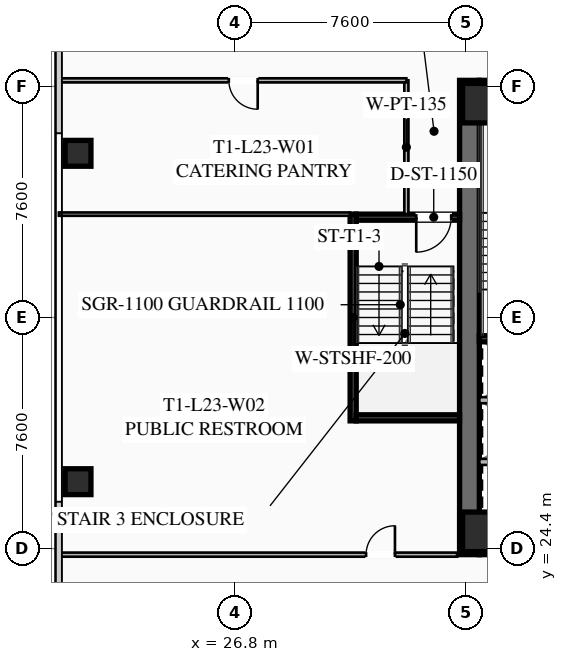
"""IFC4 building model, lengths in metres.
Left out: names, types, materials, properties, quantities, classifications, styles, units other than length and angle.
Written with IfcOpenShell. Run it as: python <this file> out.ifc"""

import sys

from ifc_helpers import new_model, si_unit, direction, frame, frame_2d, origin, origin_2d, place, context, subcontext, project, spatial, rectangle, hollow_rectangle, extrude, element, fill, save


model = new_model("IFC4")
c1 = context("Model", 3, precision=1e-05, world=origin(), true_north=direction((0.0, 1.0)))
c2 = subcontext(c1, "Body", "Model", "MODEL_VIEW")
j1 = project(units=[si_unit("LENGTHUNIT", "METRE"), si_unit("PLANEANGLEUNIT", "RADIAN")], contexts=[c1])
p1 = place(None, origin())
s1 = spatial("IfcSite", under=j1, at=p1, CompositionType="ELEMENT")
p2 = place(p1, origin())
s2 = spatial("IfcBuilding", under=s1, at=p2, CompositionType="ELEMENT")
p3 = place(p2, frame((0.0, 0.0, 88.5)))
s3 = spatial("IfcBuildingStorey", under=s2, at=p3, CompositionType="ELEMENT", Elevation=88.5)
p4 = place(p3, frame((34.525, 24.2, 0.0), z_axis=(0.0, 0.0, 1.0), x_axis=(0.0, 1.0, 0.0)))
e1 = element("IfcWall", 1, at=p4, inside=s3, PredefinedType="SHEAR", context=c2, shape_type="SweptSolid", body=[
    extrude(rectangle(XDim=15.6, YDim=0.65, at=frame_2d((7.8, 0.0))), origin(), (0.0, 0.0, 1.0), 3.55),
])
p5 = place(p3, frame((49.15, 24.525, 0.0), z_axis=(0.0, 0.0, 1.0), x_axis=(-1.0, 0.0, 0.0)))
e2 = element("IfcWall", 2, at=p5, inside=s3, PredefinedType="SHEAR", context=c2, shape_type="SweptSolid", body=[
    extrude(rectangle(XDim=14.3, YDim=0.65, at=frame_2d((7.15, 0.0))), origin(), (0.0, 0.0, 1.0), 3.55),
])
p6 = place(p5, frame((8.85, 0.0, 0.0)))
e3 = element("IfcOpeningElement", 3, at=p6, cuts=e2, PredefinedType="OPENING", context=c2, shape_type="SweptSolid", body=[
    extrude(rectangle(XDim=1.25, YDim=2.25, at=frame_2d((0.625, 1.125))), frame((0.0, 0.335, 0.0), z_axis=(0.0, -1.0, 0.0), x_axis=(1.0, 0.0, 0.0)), (0.0, 0.0, 1.0), 0.67),
])
p7 = place(p5, frame((3.8, 0.0, 0.0)))
e4 = element("IfcOpeningElement", 4, at=p7, cuts=e2, PredefinedType="OPENING", context=c2, shape_type="SweptSolid", body=[
    extrude(rectangle(XDim=1.25, YDim=2.25, at=frame_2d((0.625, 1.125))), frame((0.0, 0.335, 0.0), z_axis=(0.0, -1.0, 0.0), x_axis=(1.0, 0.0, 0.0)), (0.0, 0.0, 1.0), 0.67),
])
p8 = place(p3, frame((34.85, 39.475, 0.0), z_axis=(0.0, 0.0, 1.0), x_axis=(1.0, 0.0, 0.0)))
e5 = element("IfcWall", 5, at=p8, inside=s3, PredefinedType="SHEAR", context=c2, shape_type="SweptSolid", body=[
    extrude(rectangle(XDim=14.3, YDim=0.65, at=frame_2d((7.15, 0.0))), origin(), (0.0, 0.0, 1.0), 3.55),
])
p9 = place(p8, frame((4.2, 0.0, 0.0)))
e6 = element("IfcOpeningElement", 6, at=p9, cuts=e5, PredefinedType="OPENING", context=c2, shape_type="SweptSolid", body=[
    extrude(rectangle(XDim=1.25, YDim=2.25, at=frame_2d((0.625, 1.125))), frame((0.0, 0.335, 0.0), z_axis=(0.0, -1.0, 0.0), x_axis=(1.0, 0.0, 0.0)), (0.0, 0.0, 1.0), 0.67),
])
p10 = place(p8, frame((9.25, 0.0, 0.0)))
e7 = element("IfcOpeningElement", 7, at=p10, cuts=e5, PredefinedType="OPENING", context=c2, shape_type="SweptSolid", body=[
    extrude(rectangle(XDim=1.25, YDim=2.25, at=frame_2d((0.625, 1.125))), frame((0.0, 0.335, 0.0), z_axis=(0.0, -1.0, 0.0), x_axis=(1.0, 0.0, 0.0)), (0.0, 0.0, 1.0), 0.67),
])
for number, where, z_axis, x_axis in (
    (8, (34.95, 24.95, 0.0), (0.0, 0.0, 1.0), (1.0, 0.0, 0.0)),
    (9, (34.95, 39.05, 0.0), (0.0, 0.0, 1.0), (1.0, 0.0, 0.0)),
):
    element("IfcColumn", number, at=place(p3, frame(where, z_axis=z_axis, x_axis=x_axis)), inside=s3, PredefinedType="COLUMN", context=c2, shape_type="SweptSolid", body=[
        extrude(hollow_rectangle(XDim=1.3, YDim=1.3, WallThickness=0.05, at=origin_2d()), origin(), (0.0, 0.0, 1.0), 3.35),
    ])
for number, where, z_axis, x_axis in (
    (10, (21.65, 37.4, 0.0), (0.0, 0.0, 1.0), (1.0, 0.0, 0.0)),
    (11, (21.65, 26.6, 0.0), (0.0, 0.0, 1.0), (1.0, 0.0, 0.0)),
):
    element("IfcColumn", number, at=place(p3, frame(where, z_axis=z_axis, x_axis=x_axis)), inside=s3, PredefinedType="COLUMN", context=c2, shape_type="SweptSolid", body=[
        extrude(hollow_rectangle(XDim=0.85, YDim=0.85, WallThickness=0.035, at=origin_2d()), origin(), (0.0, 0.0, 1.0), 3.35),
    ])
for number, where, z_axis, x_axis in (
    (12, (34.85, 31.3, 0.0), (0.0, 0.0, 1.0), (1.0, 0.0, 0.0)),
    (13, (34.85, 38.7, 0.0), (0.0, 0.0, 1.0), (1.0, 0.0, 0.0)),
):
    element("IfcWall", number, at=place(p3, frame(where, z_axis=z_axis, x_axis=x_axis)), inside=s3, PredefinedType="SHEAR", context=c2, shape_type="SweptSolid", body=[
        extrude(rectangle(XDim=3.45, YDim=0.2, at=frame_2d((1.725, 0.0))), origin(), (0.0, 0.0, 1.0), 3.35),
    ])
for number, where, z_axis, x_axis in (
    (14, (34.85, 27.25, 0.0), (0.0, 0.0, 1.0), (1.0, 0.0, 0.0)),
    (15, (34.85, 29.28, 0.0), (0.0, 0.0, 1.0), (1.0, 0.0, 0.0)),
):
    element("IfcWall", number, at=place(p3, frame(where, z_axis=z_axis, x_axis=x_axis)), inside=s3, PredefinedType="SOLIDWALL", context=c2, shape_type="SweptSolid", body=[
        extrude(rectangle(XDim=3.1, YDim=0.2, at=frame_2d((1.55, 0.0))), origin(), (0.0, 0.0, 1.0), 3.35),
    ])
p11 = place(p3, frame((30.7, 28.6, 0.0), z_axis=(0.0, 0.0, 1.0), x_axis=(0.0, 1.0, 0.0)))
e16 = element("IfcWall", 16, at=p11, inside=s3, PredefinedType="SHEAR", context=c2, shape_type="SweptSolid", body=[
    extrude(rectangle(XDim=6.8, YDim=0.2, at=frame_2d((3.4, 0.0))), origin(), (0.0, 0.0, 1.0), 3.35),
])
p12 = place(p3, frame((34.2, 35.3, 0.0), z_axis=(0.0, 0.0, 1.0), x_axis=(-1.0, 0.0, 0.0)))
e17 = element("IfcWall", 17, at=p12, inside=s3, PredefinedType="SHEAR", context=c2, shape_type="SweptSolid", body=[
    extrude(rectangle(XDim=3.4, YDim=0.2, at=frame_2d((1.7, 0.0))), origin(), (0.0, 0.0, 1.0), 3.35),
])
p13 = place(p12, frame((0.275, 0.0, 0.0)))
e18 = element("IfcOpeningElement", 18, at=p13, cuts=e17, PredefinedType="OPENING", context=c2, shape_type="SweptSolid", body=[
    extrude(rectangle(XDim=1.15, YDim=2.2, at=frame_2d((0.575, 1.1))), frame((0.0, 0.11, 0.0), z_axis=(0.0, -1.0, 0.0), x_axis=(1.0, 0.0, 0.0)), (0.0, 0.0, 1.0), 0.22),
])
p14 = place(p3, frame((30.8, 28.7, 0.0), z_axis=(0.0, 0.0, 1.0), x_axis=(1.0, 0.0, 0.0)))
e19 = element("IfcWall", 19, at=p14, inside=s3, PredefinedType="SHEAR", context=c2, shape_type="SweptSolid", body=[
    extrude(rectangle(XDim=3.4, YDim=0.2, at=frame_2d((1.7, 0.0))), origin(), (0.0, 0.0, 1.0), 3.35),
])
p15 = place(p3, frame((32.45, 35.4, 0.0), z_axis=(0.0, 0.0, 1.0), x_axis=(0.0, 1.0, 0.0)))
e20 = element("IfcWall", 20, at=p15, inside=s3, PredefinedType="PARTITIONING", context=c2, shape_type="SweptSolid", body=[
    extrude(rectangle(XDim=4.4, YDim=0.135, at=frame_2d((2.2, 0.0))), origin(), (0.0, 0.0, 1.0), 2.703),
])
p16 = place(p3, frame((32.45, 39.8, 0.0), z_axis=(0.0, 0.0, 1.0), x_axis=(-1.0, 0.0, 0.0)))
e21 = element("IfcWall", 21, at=p16, inside=s3, PredefinedType="PARTITIONING", context=c2, shape_type="SweptSolid", body=[
    extrude(rectangle(XDim=11.43, YDim=0.135, at=frame_2d((5.715, 0.0))), origin(), (0.0, 0.0, 1.0), 2.703),
])
p17 = place(p16, frame((4.89, 0.0, 0.0)))
e22 = element("IfcOpeningElement", 22, at=p17, cuts=e21, PredefinedType="OPENING", context=c2, shape_type="SweptSolid", body=[
    extrude(rectangle(XDim=0.95, YDim=2.05, at=frame_2d((0.475, 1.025))), frame((0.0, 0.077, 0.0), z_axis=(0.0, -1.0, 0.0), x_axis=(1.0, 0.0, 0.0)), (0.0, 0.0, 1.0), 0.155),
])
p18 = place(p3, frame((21.02, 24.2, 0.0), z_axis=(0.0, 0.0, 1.0), x_axis=(1.0, 0.0, 0.0)))
e23 = element("IfcWall", 23, at=p18, inside=s3, PredefinedType="PARTITIONING", context=c2, shape_type="SweptSolid", body=[
    extrude(rectangle(XDim=13.1, YDim=0.135, at=frame_2d((6.55, 0.0))), origin(), (0.0, 0.0, 1.0), 2.703),
])
p19 = place(p18, frame((10.105, 0.0, 0.0)))
e24 = element("IfcOpeningElement", 24, at=p19, cuts=e23, PredefinedType="OPENING", context=c2, shape_type="SweptSolid", body=[
    extrude(rectangle(XDim=0.95, YDim=2.05, at=frame_2d((0.475, 1.025))), frame((0.0, 0.077, 0.0), z_axis=(0.0, -1.0, 0.0), x_axis=(1.0, 0.0, 0.0)), (0.0, 0.0, 1.0), 0.155),
])
p20 = place(p3, frame((30.6, 35.4, 0.0), z_axis=(0.0, 0.0, 1.0), x_axis=(-1.0, 0.0, 0.0)))
e25 = element("IfcWall", 25, at=p20, inside=s3, PredefinedType="PARTITIONING", context=c2, shape_type="SweptSolid", body=[
    extrude(rectangle(XDim=9.58, YDim=0.11, at=frame_2d((4.79, 0.0))), origin(), (0.0, 0.0, 1.0), 2.703),
])
p21 = place(p13, origin())
e26 = element("IfcDoor", 26, at=p21, inside=s3, OperationType="SINGLE_SWING_RIGHT", PredefinedType="DOOR", context=c2, shape_type="SweptSolid", body=[
    extrude(rectangle(XDim=1.15, YDim=2.2, at=frame_2d((0.575, 1.1))), frame((0.0, 0.025, 0.0), z_axis=(0.0, -1.0, 0.0), x_axis=(1.0, 0.0, 0.0)), (0.0, 0.0, 1.0), 0.05),
])
fill(e18, e26)
p22 = place(p17, origin())
e27 = element("IfcDoor", 27, at=p22, inside=s3, OperationType="SINGLE_SWING_LEFT", PredefinedType="DOOR", context=c2, shape_type="SweptSolid", body=[
    extrude(rectangle(XDim=0.95, YDim=2.05, at=frame_2d((0.475, 1.025))), frame((0.0, 0.025, 0.0), z_axis=(0.0, -1.0, 0.0), x_axis=(1.0, 0.0, 0.0)), (0.0, 0.0, 1.0), 0.05),
])
fill(e22, e27)
p23 = place(p19, origin())
e28 = element("IfcDoor", 28, at=p23, inside=s3, OperationType="SINGLE_SWING_RIGHT", PredefinedType="DOOR", context=c2, shape_type="SweptSolid", body=[
    extrude(rectangle(XDim=0.95, YDim=2.05, at=frame_2d((0.475, 1.025))), frame((0.0, 0.025, 0.0), z_axis=(0.0, -1.0, 0.0), x_axis=(1.0, 0.0, 0.0)), (0.0, 0.0, 1.0), 0.05),
])
fill(e24, e28)
save(model, sys.argv[1])
